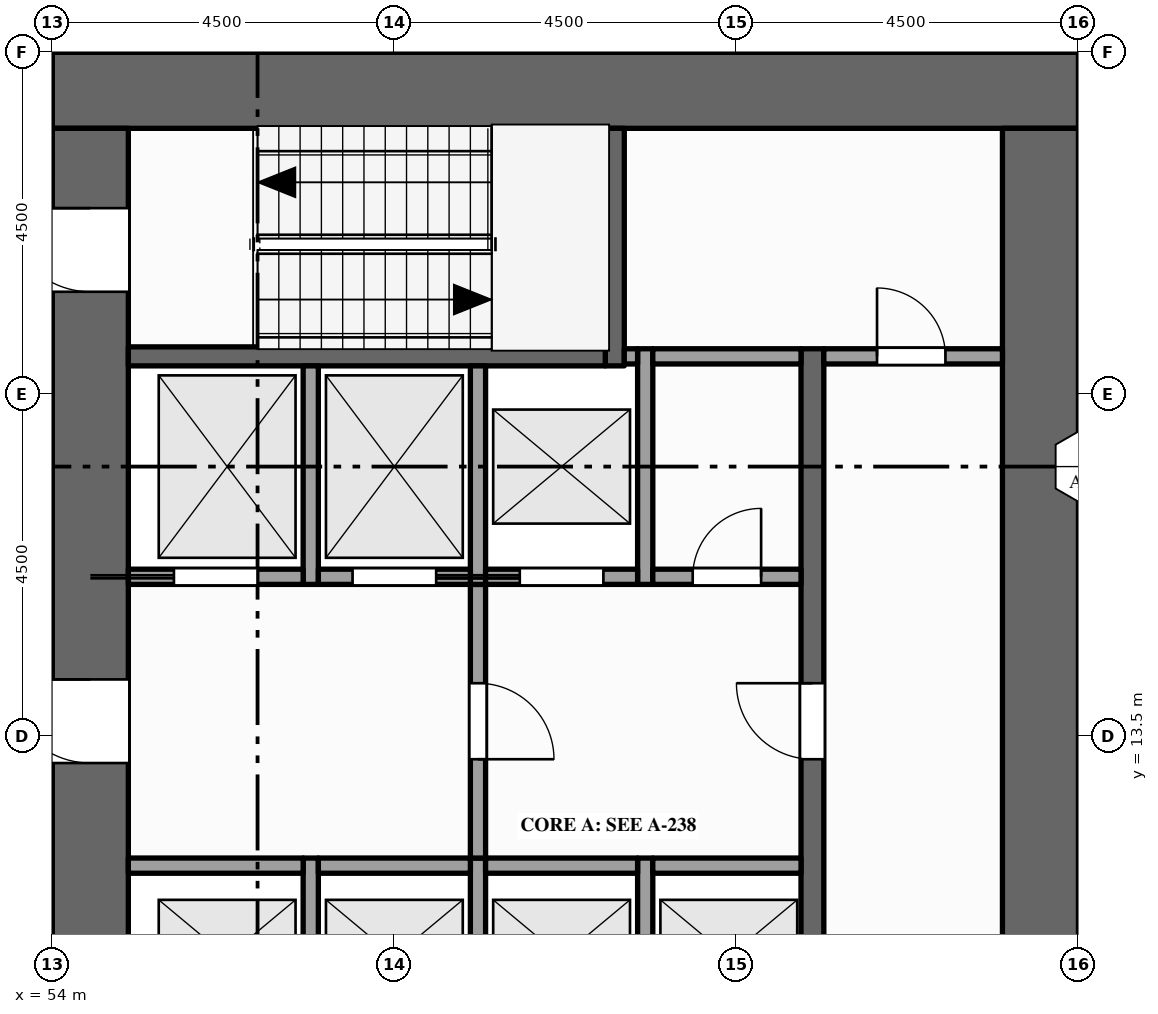
"""IFC4 building model, lengths in metres.
Left out: names, types, materials, properties, quantities, classifications, styles, units other than length and angle.
Written with IfcOpenShell. Run it as: python <this file> out.ifc"""

import sys

from ifc_helpers import new_model, si_unit, direction, frame, frame_2d, origin, place, context, subcontext, project, spatial, rectangle, extrude, element, fill, save


model = new_model("IFC4")
c1 = context("Model", 3, precision=1e-05, world=origin(), true_north=direction((0.0, 1.0)))
c2 = subcontext(c1, "Body", "Model", "MODEL_VIEW")
j1 = project(units=[si_unit("LENGTHUNIT", "METRE"), si_unit("PLANEANGLEUNIT", "RADIAN")], contexts=[c1])
p1 = place(None, origin())
s1 = spatial("IfcSite", under=j1, at=p1, CompositionType="ELEMENT")
p2 = place(p1, origin())
s2 = spatial("IfcBuilding", under=s1, at=p2, CompositionType="ELEMENT")
p3 = place(p2, frame((0.0, 0.0, 211.0)))
s3 = spatial("IfcBuildingStorey", under=s2, at=p3, CompositionType="ELEMENT", Elevation=211.0)
p4 = place(p3, frame((54.0, 22.0, -0.15), z_axis=(0.0, 0.0, 1.0), x_axis=(1.0, 0.0, 0.0)))
e1 = element("IfcWall", 1, at=p4, inside=s3, PredefinedType="SHEAR", context=c2, shape_type="SweptSolid", body=[
    extrude(rectangle(XDim=13.5, YDim=1.0, at=frame_2d((6.75, 0.0))), origin(), (0.0, 0.0, 1.0), 4.0),
])
p5 = place(p3, frame((54.5, 1.0, -0.15), z_axis=(0.0, 0.0, 1.0), x_axis=(0.0, 1.0, 0.0)))
e2 = element("IfcWall", 2, at=p5, inside=s3, PredefinedType="SHEAR", context=c2, shape_type="SweptSolid", body=[
    extrude(rectangle(XDim=20.5, YDim=1.0, at=frame_2d((10.25, 0.0))), origin(), (0.0, 0.0, 1.0), 4.0),
])
p6 = place(p5, frame((6.1, 0.0, 0.15)))
e3 = element("IfcOpeningElement", 3, at=p6, cuts=e2, PredefinedType="OPENING", context=c2, shape_type="SweptSolid", body=[
    extrude(rectangle(XDim=1.8, YDim=2.1, at=frame_2d((0.9, 1.05))), frame((0.0, 0.51, 0.0), z_axis=(0.0, -1.0, 0.0), x_axis=(1.0, 0.0, 0.0)), (0.0, 0.0, 1.0), 1.02),
])
p7 = place(p5, frame((12.15, 0.0, 0.15)))
e4 = element("IfcOpeningElement", 4, at=p7, cuts=e2, PredefinedType="OPENING", context=c2, shape_type="SweptSolid", body=[
    extrude(rectangle(XDim=1.1, YDim=2.1, at=frame_2d((0.55, 1.05))), frame((0.0, 0.51, 0.0), z_axis=(0.0, -1.0, 0.0), x_axis=(1.0, 0.0, 0.0)), (0.0, 0.0, 1.0), 1.02),
])
p8 = place(p5, frame((1.15, 0.0, 0.15)))
e5 = element("IfcOpeningElement", 5, at=p8, cuts=e2, PredefinedType="OPENING", context=c2, shape_type="SweptSolid", body=[
    extrude(rectangle(XDim=1.1, YDim=2.1, at=frame_2d((0.55, 1.05))), frame((0.0, 0.51, 0.0), z_axis=(0.0, -1.0, 0.0), x_axis=(1.0, 0.0, 0.0)), (0.0, 0.0, 1.0), 1.02),
])
p9 = place(p5, frame((18.35, 0.0, 0.15)))
e6 = element("IfcOpeningElement", 6, at=p9, cuts=e2, PredefinedType="OPENING", context=c2, shape_type="SweptSolid", body=[
    extrude(rectangle(XDim=1.1, YDim=2.1, at=frame_2d((0.55, 1.05))), frame((0.0, 0.51, 0.0), z_axis=(0.0, -1.0, 0.0), x_axis=(1.0, 0.0, 0.0)), (0.0, 0.0, 1.0), 1.02),
])
p10 = place(p3, frame((67.0, 1.0, -0.15), z_axis=(0.0, 0.0, 1.0), x_axis=(0.0, 1.0, 0.0)))
e7 = element("IfcWall", 7, at=p10, inside=s3, PredefinedType="SHEAR", context=c2, shape_type="SweptSolid", body=[
    extrude(rectangle(XDim=20.5, YDim=1.0, at=frame_2d((10.25, 0.0))), origin(), (0.0, 0.0, 1.0), 4.0),
])
p11 = place(p3, frame((57.4, 9.3, 0.0), z_axis=(0.0, 0.0, 1.0), x_axis=(0.0, 1.0, 0.0)))
e8 = element("IfcWall", 8, at=p11, inside=s3, PredefinedType="SOLIDWALL", context=c2, shape_type="SweptSolid", body=[
    extrude(rectangle(XDim=2.6, YDim=0.2, at=frame_2d((1.3, 0.0))), origin(), (0.0, 0.0, 1.0), 3.85),
])
p12 = place(p3, frame((57.4, 15.5, 0.0), z_axis=(0.0, 0.0, 1.0), x_axis=(0.0, 1.0, 0.0)))
e9 = element("IfcWall", 9, at=p12, inside=s3, PredefinedType="SOLIDWALL", context=c2, shape_type="SweptSolid", body=[
    extrude(rectangle(XDim=2.875, YDim=0.2, at=frame_2d((1.438, 0.0))), origin(), (0.0, 0.0, 1.0), 3.85),
])
p13 = place(p3, frame((59.6, 9.3, 0.0), z_axis=(0.0, 0.0, 1.0), x_axis=(0.0, 1.0, 0.0)))
e10 = element("IfcWall", 10, at=p13, inside=s3, PredefinedType="SOLIDWALL", context=c2, shape_type="SweptSolid", body=[
    extrude(rectangle(XDim=2.6, YDim=0.2, at=frame_2d((1.3, 0.0))), origin(), (0.0, 0.0, 1.0), 3.85),
])
p14 = place(p3, frame((59.6, 11.9, 0.0), z_axis=(0.0, 0.0, 1.0), x_axis=(0.0, 1.0, 0.0)))
e11 = element("IfcWall", 11, at=p14, inside=s3, PredefinedType="PARTITIONING", context=c2, shape_type="SweptSolid", body=[
    extrude(rectangle(XDim=3.6, YDim=0.2, at=frame_2d((1.8, 0.0))), origin(), (0.0, 0.0, 1.0), 3.85),
])
p15 = place(p14, frame((1.3, 0.0, 0.0)))
e12 = element("IfcOpeningElement", 12, at=p15, cuts=e11, PredefinedType="OPENING", context=c2, shape_type="SweptSolid", body=[
    extrude(rectangle(XDim=1.0, YDim=2.1, at=frame_2d((0.5, 1.05))), frame((0.0, 0.11, 0.0), z_axis=(0.0, -1.0, 0.0), x_axis=(1.0, 0.0, 0.0)), (0.0, 0.0, 1.0), 0.22),
])
p16 = place(p3, frame((59.6, 15.5, 0.0), z_axis=(0.0, 0.0, 1.0), x_axis=(0.0, 1.0, 0.0)))
e13 = element("IfcWall", 13, at=p16, inside=s3, PredefinedType="SOLIDWALL", context=c2, shape_type="SweptSolid", body=[
    extrude(rectangle(XDim=2.875, YDim=0.2, at=frame_2d((1.438, 0.0))), origin(), (0.0, 0.0, 1.0), 3.85),
])
p17 = place(p3, frame((61.4, 18.375, 0.0), z_axis=(0.0, 0.0, 1.0), x_axis=(0.0, 1.0, 0.0)))
e14 = element("IfcWall", 14, at=p17, inside=s3, PredefinedType="SHEAR", context=c2, shape_type="SweptSolid", body=[
    extrude(rectangle(XDim=3.125, YDim=0.25, at=frame_2d((1.562, 0.0))), origin(), (0.0, 0.0, 1.0), 3.85),
])
p18 = place(p3, frame((61.8, 9.3, 0.0), z_axis=(0.0, 0.0, 1.0), x_axis=(0.0, 1.0, 0.0)))
e15 = element("IfcWall", 15, at=p18, inside=s3, PredefinedType="SOLIDWALL", context=c2, shape_type="SweptSolid", body=[
    extrude(rectangle(XDim=2.6, YDim=0.2, at=frame_2d((1.3, 0.0))), origin(), (0.0, 0.0, 1.0), 3.85),
])
p19 = place(p3, frame((61.8, 15.5, 0.0), z_axis=(0.0, 0.0, 1.0), x_axis=(0.0, 1.0, 0.0)))
e16 = element("IfcWall", 16, at=p19, inside=s3, PredefinedType="SOLIDWALL", context=c2, shape_type="SweptSolid", body=[
    extrude(rectangle(XDim=3.1, YDim=0.2, at=frame_2d((1.55, 0.0))), origin(), (0.0, 0.0, 1.0), 3.85),
])
p20 = place(p3, frame((64.0, 4.1, 0.0), z_axis=(0.0, 0.0, 1.0), x_axis=(0.0, 1.0, 0.0)))
e17 = element("IfcWall", 17, at=p20, inside=s3, PredefinedType="SHEAR", context=c2, shape_type="SweptSolid", body=[
    extrude(rectangle(XDim=14.5, YDim=0.3, at=frame_2d((7.25, 0.0))), origin(), (0.0, 0.0, 1.0), 3.85),
])
p21 = place(p20, frame((3.4, 0.0, 0.0)))
e18 = element("IfcOpeningElement", 18, at=p21, cuts=e17, PredefinedType="OPENING", context=c2, shape_type="SweptSolid", body=[
    extrude(rectangle(XDim=1.0, YDim=2.1, at=frame_2d((0.5, 1.05))), frame((0.0, 0.16, 0.0), z_axis=(0.0, -1.0, 0.0), x_axis=(1.0, 0.0, 0.0)), (0.0, 0.0, 1.0), 0.32),
])
p22 = place(p20, frame((9.1, 0.0, 0.0)))
e19 = element("IfcOpeningElement", 19, at=p22, cuts=e17, PredefinedType="OPENING", context=c2, shape_type="SweptSolid", body=[
    extrude(rectangle(XDim=1.0, YDim=2.1, at=frame_2d((0.5, 1.05))), frame((0.0, 0.16, 0.0), z_axis=(0.0, -1.0, 0.0), x_axis=(1.0, 0.0, 0.0)), (0.0, 0.0, 1.0), 0.32),
])
p23 = place(p3, frame((55.0, 11.8, 0.0), z_axis=(0.0, 0.0, 1.0), x_axis=(1.0, 0.0, 0.0)))
e20 = element("IfcWall", 20, at=p23, inside=s3, PredefinedType="SOLIDWALL", context=c2, shape_type="SweptSolid", body=[
    extrude(rectangle(XDim=2.3, YDim=0.2, at=frame_2d((1.15, 0.0))), origin(), (0.0, 0.0, 1.0), 3.85),
])
for number, where, z_axis, x_axis in (
    (21, (57.5, 11.8, 0.0), (0.0, 0.0, 1.0), (1.0, 0.0, 0.0)),
    (22, (59.7, 11.8, 0.0), (0.0, 0.0, 1.0), (1.0, 0.0, 0.0)),
):
    element("IfcWall", number, at=place(p3, frame(where, z_axis=z_axis, x_axis=x_axis)), inside=s3, PredefinedType="SOLIDWALL", context=c2, shape_type="SweptSolid", body=[
        extrude(rectangle(XDim=2.0, YDim=0.2, at=frame_2d((1.0, 0.0))), origin(), (0.0, 0.0, 1.0), 3.85),
    ])
p24 = place(p3, frame((61.9, 11.8, 0.0), z_axis=(0.0, 0.0, 1.0), x_axis=(1.0, 0.0, 0.0)))
e23 = element("IfcWall", 23, at=p24, inside=s3, PredefinedType="SOLIDWALL", context=c2, shape_type="SweptSolid", body=[
    extrude(rectangle(XDim=1.95, YDim=0.2, at=frame_2d((0.975, 0.0))), origin(), (0.0, 0.0, 1.0), 3.85),
])
p25 = place(p3, frame((55.0, 15.6, 0.0), z_axis=(0.0, 0.0, 1.0), x_axis=(1.0, 0.0, 0.0)))
e24 = element("IfcWall", 24, at=p25, inside=s3, PredefinedType="SOLIDWALL", context=c2, shape_type="SweptSolid", body=[
    extrude(rectangle(XDim=2.3, YDim=0.2, at=frame_2d((1.15, 0.0))), origin(), (0.0, 0.0, 1.0), 3.85),
])
p26 = place(p25, frame((0.6, 0.0, 0.012)))
e25 = element("IfcOpeningElement", 25, at=p26, cuts=e24, PredefinedType="OPENING", context=c2, shape_type="SweptSolid", body=[
    extrude(rectangle(XDim=1.1, YDim=2.1, at=frame_2d((0.55, 1.05))), frame((0.0, 0.11, 0.0), z_axis=(0.0, -1.0, 0.0), x_axis=(1.0, 0.0, 0.0)), (0.0, 0.0, 1.0), 0.22),
])
p27 = place(p3, frame((57.5, 15.6, 0.0), z_axis=(0.0, 0.0, 1.0), x_axis=(1.0, 0.0, 0.0)))
e26 = element("IfcWall", 26, at=p27, inside=s3, PredefinedType="SOLIDWALL", context=c2, shape_type="SweptSolid", body=[
    extrude(rectangle(XDim=2.0, YDim=0.2, at=frame_2d((1.0, 0.0))), origin(), (0.0, 0.0, 1.0), 3.85),
])
p28 = place(p27, frame((0.45, 0.0, 0.012)))
e27 = element("IfcOpeningElement", 27, at=p28, cuts=e26, PredefinedType="OPENING", context=c2, shape_type="SweptSolid", body=[
    extrude(rectangle(XDim=1.1, YDim=2.1, at=frame_2d((0.55, 1.05))), frame((0.0, 0.11, 0.0), z_axis=(0.0, -1.0, 0.0), x_axis=(1.0, 0.0, 0.0)), (0.0, 0.0, 1.0), 0.22),
])
p29 = place(p3, frame((59.7, 15.6, 0.0), z_axis=(0.0, 0.0, 1.0), x_axis=(1.0, 0.0, 0.0)))
e28 = element("IfcWall", 28, at=p29, inside=s3, PredefinedType="SOLIDWALL", context=c2, shape_type="SweptSolid", body=[
    extrude(rectangle(XDim=2.0, YDim=0.2, at=frame_2d((1.0, 0.0))), origin(), (0.0, 0.0, 1.0), 3.85),
])
p30 = place(p29, frame((0.45, 0.0, 0.012)))
e29 = element("IfcOpeningElement", 29, at=p30, cuts=e28, PredefinedType="OPENING", context=c2, shape_type="SweptSolid", body=[
    extrude(rectangle(XDim=1.1, YDim=2.1, at=frame_2d((0.55, 1.05))), frame((0.0, 0.11, 0.0), z_axis=(0.0, -1.0, 0.0), x_axis=(1.0, 0.0, 0.0)), (0.0, 0.0, 1.0), 0.22),
])
p31 = place(p3, frame((61.9, 15.6, 0.0), z_axis=(0.0, 0.0, 1.0), x_axis=(1.0, 0.0, 0.0)))
e30 = element("IfcWall", 30, at=p31, inside=s3, PredefinedType="PARTITIONING", context=c2, shape_type="SweptSolid", body=[
    extrude(rectangle(XDim=1.95, YDim=0.2, at=frame_2d((0.975, 0.0))), origin(), (0.0, 0.0, 1.0), 3.85),
])
p32 = place(p31, frame((0.525, 0.0, 0.0)))
e31 = element("IfcOpeningElement", 31, at=p32, cuts=e30, PredefinedType="OPENING", context=c2, shape_type="SweptSolid", body=[
    extrude(rectangle(XDim=0.9, YDim=2.1, at=frame_2d((0.45, 1.05))), frame((0.0, 0.11, 0.0), z_axis=(0.0, -1.0, 0.0), x_axis=(1.0, 0.0, 0.0)), (0.0, 0.0, 1.0), 0.22),
])
p33 = place(p3, frame((55.0, 18.5, 0.0), z_axis=(0.0, 0.0, 1.0), x_axis=(1.0, 0.0, 0.0)))
e32 = element("IfcWall", 32, at=p33, inside=s3, PredefinedType="SHEAR", context=c2, shape_type="SweptSolid", body=[
    extrude(rectangle(XDim=6.275, YDim=0.25, at=frame_2d((3.137, 0.0))), origin(), (0.0, 0.0, 1.0), 3.85),
])
p34 = place(p3, frame((61.525, 18.5, 0.0), z_axis=(0.0, 0.0, 1.0), x_axis=(1.0, 0.0, 0.0)))
e33 = element("IfcWall", 33, at=p34, inside=s3, PredefinedType="SOLIDWALL", context=c2, shape_type="SweptSolid", body=[
    extrude(rectangle(XDim=0.175, YDim=0.2, at=frame_2d((0.087, 0.0))), origin(), (0.0, 0.0, 1.0), 3.85),
])
p35 = place(p3, frame((61.9, 18.5, 0.0), z_axis=(0.0, 0.0, 1.0), x_axis=(1.0, 0.0, 0.0)))
e34 = element("IfcWall", 34, at=p35, inside=s3, PredefinedType="PARTITIONING", context=c2, shape_type="SweptSolid", body=[
    extrude(rectangle(XDim=1.95, YDim=0.2, at=frame_2d((0.975, 0.0))), origin(), (0.0, 0.0, 1.0), 3.85),
])
p36 = place(p3, frame((64.15, 18.5, 0.0), z_axis=(0.0, 0.0, 1.0), x_axis=(1.0, 0.0, 0.0)))
e35 = element("IfcWall", 35, at=p36, inside=s3, PredefinedType="PARTITIONING", context=c2, shape_type="SweptSolid", body=[
    extrude(rectangle(XDim=2.35, YDim=0.2, at=frame_2d((1.175, 0.0))), origin(), (0.0, 0.0, 1.0), 3.85),
])
p37 = place(p36, frame((0.7, 0.0, 0.0)))
e36 = element("IfcOpeningElement", 36, at=p37, cuts=e35, PredefinedType="OPENING", context=c2, shape_type="SweptSolid", body=[
    extrude(rectangle(XDim=0.9, YDim=2.1, at=frame_2d((0.45, 1.05))), frame((0.0, 0.11, 0.0), z_axis=(0.0, -1.0, 0.0), x_axis=(1.0, 0.0, 0.0)), (0.0, 0.0, 1.0), 0.22),
])
p38 = place(p26, origin())
e37 = element("IfcDoor", 37, at=p38, inside=s3, OperationType="SLIDING_TO_LEFT", PredefinedType="DOOR", context=c2, shape_type="SweptSolid", body=[
    extrude(rectangle(XDim=1.1, YDim=2.1, at=frame_2d((0.55, 1.05))), frame((0.0, 0.025, 0.0), z_axis=(0.0, -1.0, 0.0), x_axis=(1.0, 0.0, 0.0)), (0.0, 0.0, 1.0), 0.05),
])
fill(e25, e37)
p39 = place(p28, origin())
e38 = element("IfcDoor", 38, at=p39, inside=s3, OperationType="SLIDING_TO_RIGHT", PredefinedType="DOOR", context=c2, shape_type="SweptSolid", body=[
    extrude(rectangle(XDim=1.1, YDim=2.1, at=frame_2d((0.55, 1.05))), frame((0.0, 0.025, 0.0), z_axis=(0.0, -1.0, 0.0), x_axis=(1.0, 0.0, 0.0)), (0.0, 0.0, 1.0), 0.05),
])
fill(e27, e38)
p40 = place(p30, origin())
e39 = element("IfcDoor", 39, at=p40, inside=s3, OperationType="SLIDING_TO_LEFT", PredefinedType="DOOR", context=c2, shape_type="SweptSolid", body=[
    extrude(rectangle(XDim=1.1, YDim=2.1, at=frame_2d((0.55, 1.05))), frame((0.0, 0.025, 0.0), z_axis=(0.0, -1.0, 0.0), x_axis=(1.0, 0.0, 0.0)), (0.0, 0.0, 1.0), 0.05),
])
fill(e29, e39)
p41 = place(p7, origin())
e40 = element("IfcDoor", 40, at=p41, inside=s3, OperationType="SINGLE_SWING_RIGHT", PredefinedType="DOOR", context=c2, shape_type="SweptSolid", body=[
    extrude(rectangle(XDim=1.1, YDim=2.1, at=frame_2d((0.55, 1.05))), frame((0.0, 0.025, 0.0), z_axis=(0.0, -1.0, 0.0), x_axis=(1.0, 0.0, 0.0)), (0.0, 0.0, 1.0), 0.05),
])
fill(e4, e40)
p42 = place(p15, origin())
e41 = element("IfcDoor", 41, at=p42, inside=s3, OperationType="SINGLE_SWING_LEFT", PredefinedType="DOOR", context=c2, shape_type="SweptSolid", body=[
    extrude(rectangle(XDim=1.0, YDim=2.1, at=frame_2d((0.5, 1.05))), frame((0.0, 0.025, 0.0), z_axis=(0.0, -1.0, 0.0), x_axis=(1.0, 0.0, 0.0)), (0.0, 0.0, 1.0), 0.05),
])
fill(e12, e41)
p43 = place(p22, origin())
e42 = element("IfcDoor", 42, at=p43, inside=s3, OperationType="SINGLE_SWING_RIGHT", PredefinedType="DOOR", context=c2, shape_type="SweptSolid", body=[
    extrude(rectangle(XDim=1.0, YDim=2.1, at=frame_2d((0.5, 1.05))), frame((0.0, 0.025, 0.0), z_axis=(0.0, -1.0, 0.0), x_axis=(1.0, 0.0, 0.0)), (0.0, 0.0, 1.0), 0.05),
])
fill(e19, e42)
p44 = place(p9, origin())
e43 = element("IfcDoor", 43, at=p44, inside=s3, OperationType="SINGLE_SWING_RIGHT", PredefinedType="DOOR", context=c2, shape_type="SweptSolid", body=[
    extrude(rectangle(XDim=1.1, YDim=2.1, at=frame_2d((0.55, 1.05))), frame((0.0, 0.025, 0.0), z_axis=(0.0, -1.0, 0.0), x_axis=(1.0, 0.0, 0.0)), (0.0, 0.0, 1.0), 0.05),
])
fill(e6, e43)
p45 = place(p37, origin())
e44 = element("IfcDoor", 44, at=p45, inside=s3, OperationType="SINGLE_SWING_LEFT", PredefinedType="DOOR", context=c2, shape_type="SweptSolid", body=[
    extrude(rectangle(XDim=0.9, YDim=2.1, at=frame_2d((0.45, 1.05))), frame((0.0, 0.025, 0.0), z_axis=(0.0, -1.0, 0.0), x_axis=(1.0, 0.0, 0.0)), (0.0, 0.0, 1.0), 0.05),
])
fill(e36, e44)
p46 = place(p32, origin())
e45 = element("IfcDoor", 45, at=p46, inside=s3, OperationType="SINGLE_SWING_RIGHT", PredefinedType="DOOR", context=c2, shape_type="SweptSolid", body=[
    extrude(rectangle(XDim=0.9, YDim=2.1, at=frame_2d((0.45, 1.05))), frame((0.0, 0.025, 0.0), z_axis=(0.0, -1.0, 0.0), x_axis=(1.0, 0.0, 0.0)), (0.0, 0.0, 1.0), 0.05),
])
fill(e31, e45)
save(model, sys.argv[1])
